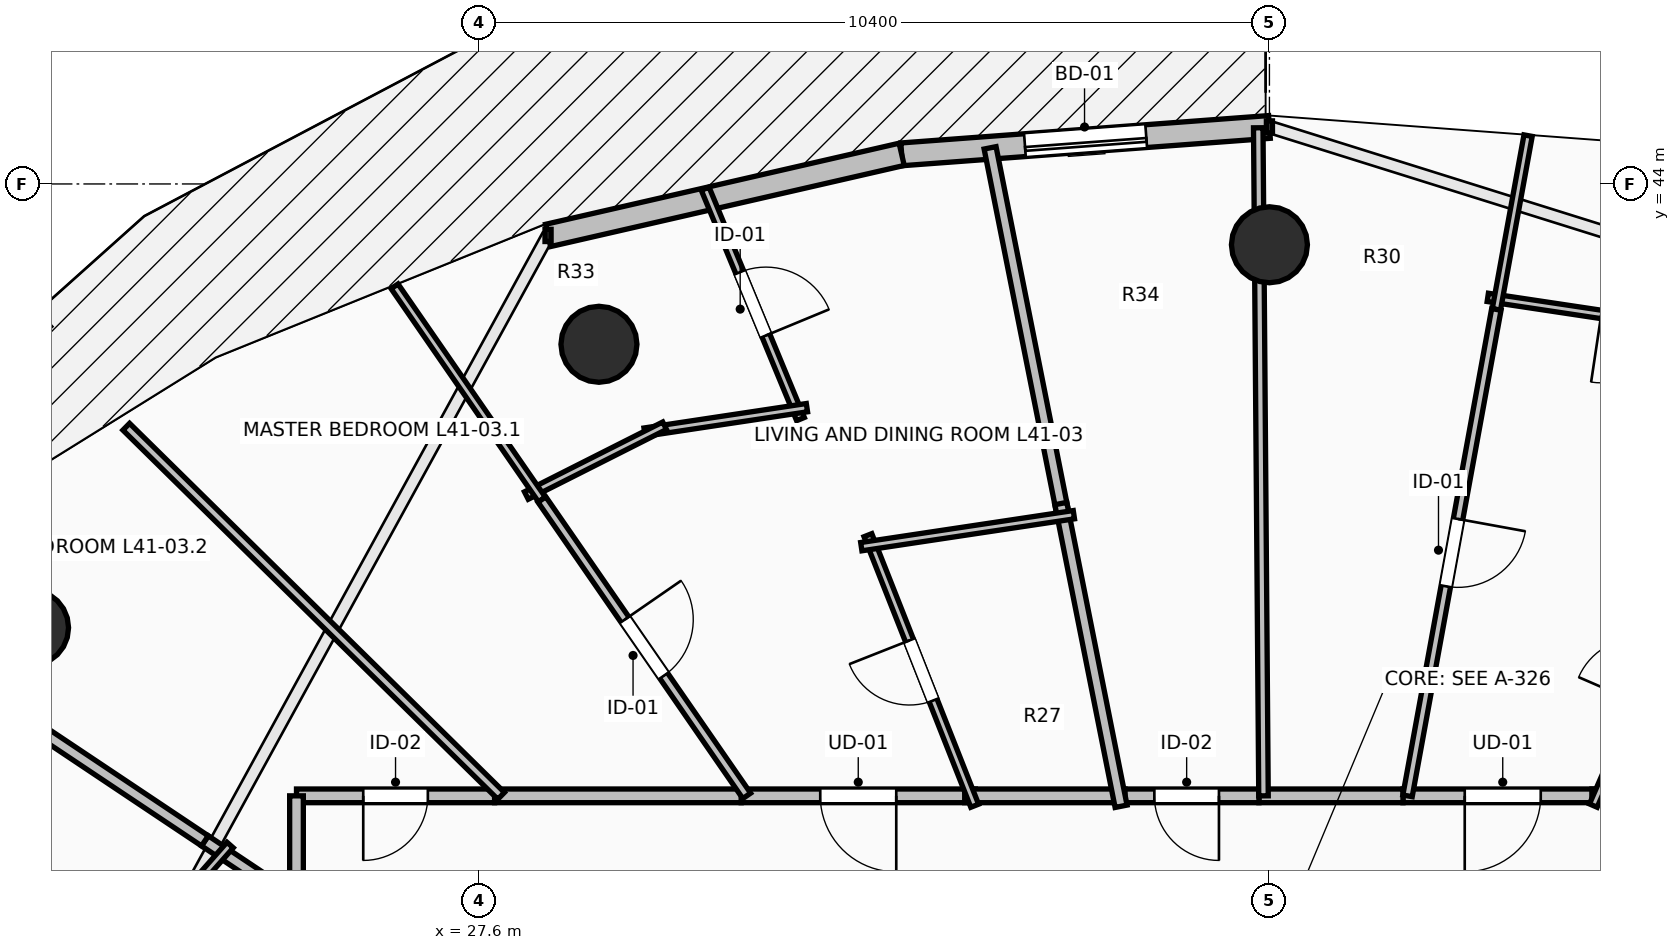
"""IFC4 building model, lengths in metres.
Left out: names, types, materials, properties, quantities, classifications, styles, units other than length and angle.
Written with IfcOpenShell. Run it as: python <this file> out.ifc"""

import sys

from ifc_helpers import new_model, si_unit, direction, frame, frame_2d, origin, origin_2d, place, context, subcontext, project, spatial, rectangle, circle, extrude, element, fill, save


model = new_model("IFC4")
c1 = context("Model", 3, precision=1e-05, world=origin(), true_north=direction((0.0, 1.0)))
c2 = subcontext(c1, "Body", "Model", "MODEL_VIEW")
j1 = project(units=[si_unit("LENGTHUNIT", "METRE"), si_unit("PLANEANGLEUNIT", "RADIAN")], contexts=[c1])
p1 = place(None, origin())
s1 = spatial("IfcSite", under=j1, at=p1, CompositionType="ELEMENT")
p2 = place(p1, origin())
s2 = spatial("IfcBuilding", under=s1, at=p2, CompositionType="ELEMENT")
p3 = place(p2, frame((0.0, 0.0, 153.6)))
s3 = spatial("IfcBuildingStorey", under=s2, at=p3, CompositionType="ELEMENT", Elevation=153.6)
for number, where, z_axis, x_axis in (
    (1, (38.0, 43.2, 0.0), (0.0, 0.0, 1.0), (0.0, 1.0, 0.0)),
    (2, (29.179, 41.891, 0.0), (0.0, 0.0, 1.0), (-0.383, 0.924, 0.0)),
    (3, (21.701, 38.162, 0.0), (0.0, 0.0, 1.0), (-0.707, 0.707, 0.0)),
):
    element("IfcColumn", number, at=place(p3, frame(where, z_axis=z_axis, x_axis=x_axis)), inside=s3, PredefinedType="COLUMN", context=c2, shape_type="SweptSolid", body=[
        extrude(circle(Radius=0.5, at=origin_2d()), origin(), (0.0, 0.0, 1.0), 3.5),
    ])
p4 = place(p3, frame((38.0, 44.75, 0.0), z_axis=(0.0, 0.0, 1.0), x_axis=(-0.997237740067, -0.074275768499, 0.0)))
e4 = element("IfcWall", 4, at=p4, inside=s3, PredefinedType="STANDARD", context=c2, shape_type="SweptSolid", body=[
    extrude(rectangle(XDim=4.852, YDim=0.3, at=frame_2d((2.426, 0.0))), origin(), (0.0, 0.0, 1.0), 3.24),
])
p5 = place(p4, frame((1.626, 0.0, 0.0)))
e5 = element("IfcOpeningElement", 5, at=p5, cuts=e4, PredefinedType="OPENING", context=c2, shape_type="SweptSolid", body=[
    extrude(rectangle(XDim=1.6, YDim=2.3, at=frame_2d((0.8, 1.15))), frame((0.0, 0.165, 0.0), z_axis=(0.0, -1.0, 0.0), x_axis=(1.0, 0.0, 0.0)), (0.0, 0.0, 1.0), 0.33),
])
p6 = place(p3, frame((33.162, 44.39, 0.0), z_axis=(0.0, 0.0, 1.0), x_axis=(-0.974698897188, -0.223521944832, 0.0)))
e6 = element("IfcWall", 6, at=p6, inside=s3, PredefinedType="STANDARD", context=c2, shape_type="SweptSolid", body=[
    extrude(rectangle(XDim=4.773, YDim=0.3, at=frame_2d((2.387, 0.0))), origin(), (0.0, 0.0, 1.0), 3.24),
])
p7 = place(p3, frame((42.382, 35.95, 0.0), z_axis=(0.0, 0.0, 1.0), x_axis=(-1.0, 0.0, 0.0)))
e7 = element("IfcWall", 7, at=p7, inside=s3, PredefinedType="PARTITIONING", context=c2, shape_type="SweptSolid", body=[
    extrude(rectangle(XDim=2.625, YDim=0.18, at=frame_2d((1.312, 0.0))), origin(), (0.0, 0.0, 1.0), 2.886),
])
p8 = place(p7, frame((0.812, 0.0, 0.0)))
e8 = element("IfcOpeningElement", 8, at=p8, cuts=e7, PredefinedType="OPENING", context=c2, shape_type="SweptSolid", body=[
    extrude(rectangle(XDim=1.0, YDim=2.15, at=frame_2d((0.5, 1.075))), frame((0.0, 0.105, 0.0), z_axis=(0.0, -1.0, 0.0), x_axis=(1.0, 0.0, 0.0)), (0.0, 0.0, 1.0), 0.21),
])
p9 = place(p3, frame((44.728, 35.95, 0.0), z_axis=(0.0, 0.0, 1.0), x_axis=(-1.0, 0.0, 0.0)))
e9 = element("IfcWall", 9, at=p9, inside=s3, PredefinedType="PARTITIONING", context=c2, shape_type="SweptSolid", body=[
    extrude(rectangle(XDim=2.486, YDim=0.18, at=frame_2d((1.243, 0.0))), origin(), (0.0, 0.0, 1.0), 2.886),
])
p10 = place(p3, frame((39.757, 35.95, 0.0), z_axis=(0.0, 0.0, 1.0), x_axis=(-1.0, 0.0, 0.0)))
e10 = element("IfcWall", 10, at=p10, inside=s3, PredefinedType="PARTITIONING", context=c2, shape_type="SweptSolid", body=[
    extrude(rectangle(XDim=1.895, YDim=0.18, at=frame_2d((0.948, 0.0))), origin(), (0.0, 0.0, 1.0), 2.886),
])
p11 = place(p3, frame((37.862, 35.95, 0.0), z_axis=(0.0, 0.0, 1.0), x_axis=(-1.0, 0.0, 0.0)))
e11 = element("IfcWall", 11, at=p11, inside=s3, PredefinedType="PARTITIONING", context=c2, shape_type="SweptSolid", body=[
    extrude(rectangle(XDim=1.902, YDim=0.18, at=frame_2d((0.951, 0.0))), origin(), (0.0, 0.0, 1.0), 2.886),
])
p12 = place(p11, frame((0.526, 0.0, 0.0)))
e12 = element("IfcOpeningElement", 12, at=p12, cuts=e11, PredefinedType="OPENING", context=c2, shape_type="SweptSolid", body=[
    extrude(rectangle(XDim=0.85, YDim=2.1, at=frame_2d((0.425, 1.05))), frame((0.0, 0.105, 0.0), z_axis=(0.0, -1.0, 0.0), x_axis=(1.0, 0.0, 0.0)), (0.0, 0.0, 1.0), 0.21),
])
p13 = place(p3, frame((34.131, 35.95, 0.0), z_axis=(0.0, 0.0, 1.0), x_axis=(-1.0, 0.0, 0.0)))
e13 = element("IfcWall", 13, at=p13, inside=s3, PredefinedType="PARTITIONING", context=c2, shape_type="SweptSolid", body=[
    extrude(rectangle(XDim=3.081, YDim=0.18, at=frame_2d((1.541, 0.0))), origin(), (0.0, 0.0, 1.0), 2.886),
])
p14 = place(p13, frame((1.041, 0.0, 0.0)))
e14 = element("IfcOpeningElement", 14, at=p14, cuts=e13, PredefinedType="OPENING", context=c2, shape_type="SweptSolid", body=[
    extrude(rectangle(XDim=1.0, YDim=2.15, at=frame_2d((0.5, 1.075))), frame((0.0, 0.105, 0.0), z_axis=(0.0, -1.0, 0.0), x_axis=(1.0, 0.0, 0.0)), (0.0, 0.0, 1.0), 0.21),
])
p15 = place(p3, frame((36.1, 35.95, 0.0), z_axis=(0.0, 0.0, 1.0), x_axis=(-1.0, 0.0, 0.0)))
e15 = element("IfcWall", 15, at=p15, inside=s3, PredefinedType="PARTITIONING", context=c2, shape_type="SweptSolid", body=[
    extrude(rectangle(XDim=2.109, YDim=0.18, at=frame_2d((1.055, 0.0))), origin(), (0.0, 0.0, 1.0), 2.886),
])
p16 = place(p3, frame((31.05, 35.95, 0.0), z_axis=(0.0, 0.0, 1.0), x_axis=(-1.0, 0.0, 0.0)))
e16 = element("IfcWall", 16, at=p16, inside=s3, PredefinedType="PARTITIONING", context=c2, shape_type="SweptSolid", body=[
    extrude(rectangle(XDim=3.244, YDim=0.18, at=frame_2d((1.622, 0.0))), origin(), (0.0, 0.0, 1.0), 2.432),
])
p17 = place(p3, frame((27.806, 35.95, 0.0), z_axis=(0.0, 0.0, 1.0), x_axis=(-1.0, 0.0, 0.0)))
e17 = element("IfcWall", 17, at=p17, inside=s3, PredefinedType="PARTITIONING", context=c2, shape_type="SweptSolid", body=[
    extrude(rectangle(XDim=2.606, YDim=0.18, at=frame_2d((1.303, 0.0))), origin(), (0.0, 0.0, 1.0), 2.432),
])
p18 = place(p17, frame((0.878, 0.0, 0.0)))
e18 = element("IfcOpeningElement", 18, at=p18, cuts=e17, PredefinedType="OPENING", context=c2, shape_type="SweptSolid", body=[
    extrude(rectangle(XDim=0.85, YDim=2.1, at=frame_2d((0.425, 1.05))), frame((0.0, 0.105, 0.0), z_axis=(0.0, -1.0, 0.0), x_axis=(1.0, 0.0, 0.0)), (0.0, 0.0, 1.0), 0.21),
])
p19 = place(p3, frame((25.2, 35.95, 0.0), z_axis=(0.0, 0.0, 1.0), x_axis=(0.0, -1.0, 0.0)))
e19 = element("IfcWall", 19, at=p19, inside=s3, PredefinedType="PARTITIONING", context=c2, shape_type="SweptSolid", body=[
    extrude(rectangle(XDim=1.457, YDim=0.18, at=frame_2d((0.729, 0.0))), origin(), (0.0, 0.0, 1.0), 2.432),
])
p20 = place(p3, frame((42.261, 35.822, 0.0), z_axis=(0.0, 0.0, 1.0), x_axis=(0.398098222937, 0.917342795739, 0.0)))
e20 = element("IfcWall", 20, at=p20, inside=s3, PredefinedType="PARTITIONING", context=c2, shape_type="SweptSolid", body=[
    extrude(rectangle(XDim=3.797, YDim=0.11, at=frame_2d((1.898, 0.0))), origin(), (0.0, 0.0, 1.0), 2.886),
])
p21 = place(p20, frame((1.473, 0.0, 0.0)))
e21 = element("IfcOpeningElement", 21, at=p21, cuts=e20, PredefinedType="OPENING", context=c2, shape_type="SweptSolid", body=[
    extrude(rectangle(XDim=0.85, YDim=2.1, at=frame_2d((0.425, 1.05))), frame((0.0, 0.07, 0.0), z_axis=(0.0, -1.0, 0.0), x_axis=(1.0, 0.0, 0.0)), (0.0, 0.0, 1.0), 0.14),
])
p22 = place(p3, frame((44.75, 41.925, 0.0), z_axis=(0.0, 0.0, 1.0), x_axis=(-0.988899781081, 0.148584060306, 0.0)))
e22 = element("IfcWall", 22, at=p22, inside=s3, PredefinedType="PARTITIONING", context=c2, shape_type="SweptSolid", body=[
    extrude(rectangle(XDim=3.92, YDim=0.11, at=frame_2d((1.96, 0.0))), origin(), (0.0, 0.0, 1.0), 3.24),
])
p23 = place(p22, frame((1.51, 0.0, 0.0)))
e23 = element("IfcOpeningElement", 23, at=p23, cuts=e22, PredefinedType="OPENING", context=c2, shape_type="SweptSolid", body=[
    extrude(rectangle(XDim=0.9, YDim=2.1, at=frame_2d((0.45, 1.05))), frame((0.0, 0.07, 0.0), z_axis=(0.0, -1.0, 0.0), x_axis=(1.0, 0.0, 0.0)), (0.0, 0.0, 1.0), 0.14),
])
p24 = place(p3, frame((40.986, 42.349, 0.0), z_axis=(0.0, 0.0, 1.0), x_axis=(0.179523238587, 0.983753732805, 0.0)))
e24 = element("IfcWall", 24, at=p24, inside=s3, PredefinedType="PARTITIONING", context=c2, shape_type="SweptSolid", body=[
    extrude(rectangle(XDim=2.324, YDim=0.11, at=frame_2d((1.162, 0.0))), origin(), (0.0, 0.0, 1.0), 2.728),
])
p25 = place(p3, frame((40.986, 42.349, 0.0), z_axis=(0.0, 0.0, 1.0), x_axis=(-0.179654893395, -0.983729698281, 0.0)))
e25 = element("IfcWall", 25, at=p25, inside=s3, PredefinedType="PARTITIONING", context=c2, shape_type="SweptSolid", body=[
    extrude(rectangle(XDim=6.505, YDim=0.125, at=frame_2d((3.253, 0.0))), origin(), (0.0, 0.0, 1.0), 2.886),
])
p26 = place(p25, frame((2.802, 0.0, 0.0)))
e26 = element("IfcOpeningElement", 26, at=p26, cuts=e25, PredefinedType="OPENING", context=c2, shape_type="SweptSolid", body=[
    extrude(rectangle(XDim=0.9, YDim=2.1, at=frame_2d((0.45, 1.05))), frame((0.0, 0.077, 0.0), z_axis=(0.0, -1.0, 0.0), x_axis=(1.0, 0.0, 0.0)), (0.0, 0.0, 1.0), 0.155),
])
p27 = place(p3, frame((37.853, 44.739, 0.0), z_axis=(0.0, 0.0, 1.0), x_axis=(0.007860868226, -0.999969102898, 0.0)))
e27 = element("IfcWall", 27, at=p27, inside=s3, PredefinedType="PARTITIONING", context=c2, shape_type="SweptSolid", body=[
    extrude(rectangle(XDim=8.789, YDim=0.125, at=frame_2d((4.395, 0.0))), origin(), (0.0, 0.0, 1.0), 2.432),
])
p28 = place(p3, frame((34.325, 44.475, 0.0), z_axis=(0.0, 0.0, 1.0), x_axis=(0.195054941626, -0.980792317337, 0.0)))
e28 = element("IfcWall", 28, at=p28, inside=s3, PredefinedType="PARTITIONING", context=c2, shape_type="SweptSolid", body=[
    extrude(rectangle(XDim=4.911, YDim=0.16, at=frame_2d((2.456, 0.0))), origin(), (0.0, 0.0, 1.0), 2.432),
])
p29 = place(p3, frame((35.256, 39.795, 0.0), z_axis=(0.0, 0.0, 1.0), x_axis=(0.195214230991, -0.980760625239, 0.0)))
e29 = element("IfcWall", 29, at=p29, inside=s3, PredefinedType="PARTITIONING", context=c2, shape_type="SweptSolid", body=[
    extrude(rectangle(XDim=4.061, YDim=0.16, at=frame_2d((2.03, 0.0))), origin(), (0.0, 0.0, 1.0), 2.886),
])
p30 = place(p3, frame((34.122, 35.82, 0.0), z_axis=(0.0, 0.0, 1.0), x_axis=(-0.36711859649, 0.930174142896, 0.0)))
e30 = element("IfcWall", 30, at=p30, inside=s3, PredefinedType="PARTITIONING", context=c2, shape_type="SweptSolid", body=[
    extrude(rectangle(XDim=3.826, YDim=0.11, at=frame_2d((1.913, 0.0))), origin(), (0.0, 0.0, 1.0), 2.432),
])
p31 = place(p30, frame((1.488, 0.0, 0.0)))
e31 = element("IfcOpeningElement", 31, at=p31, cuts=e30, PredefinedType="OPENING", context=c2, shape_type="SweptSolid", body=[
    extrude(rectangle(XDim=0.85, YDim=2.1, at=frame_2d((0.425, 1.05))), frame((0.0, 0.07, 0.0), z_axis=(0.0, -1.0, 0.0), x_axis=(1.0, 0.0, 0.0)), (0.0, 0.0, 1.0), 0.14),
])
p32 = place(p3, frame((32.631, 39.228, 0.0), z_axis=(0.0, 0.0, 1.0), x_axis=(0.988890718673, 0.148644362566, 0.0)))
e32 = element("IfcWall", 32, at=p32, inside=s3, PredefinedType="PARTITIONING", context=c2, shape_type="SweptSolid", body=[
    extrude(rectangle(XDim=2.828, YDim=0.11, at=frame_2d((1.414, 0.0))), origin(), (0.0, 0.0, 1.0), 2.432),
])
p33 = place(p3, frame((30.576, 43.938, 0.0), z_axis=(0.0, 0.0, 1.0), x_axis=(0.382336453712, -0.924023179451, 0.0)))
e33 = element("IfcWall", 33, at=p33, inside=s3, PredefinedType="PARTITIONING", context=c2, shape_type="SweptSolid", body=[
    extrude(rectangle(XDim=3.28, YDim=0.11, at=frame_2d((1.64, 0.0))), origin(), (0.0, 0.0, 1.0), 2.728),
])
p34 = place(p33, frame((1.19, 0.0, 0.0)))
e34 = element("IfcOpeningElement", 34, at=p34, cuts=e33, PredefinedType="OPENING", context=c2, shape_type="SweptSolid", body=[
    extrude(rectangle(XDim=0.9, YDim=2.1, at=frame_2d((0.45, 1.05))), frame((0.0, 0.07, 0.0), z_axis=(0.0, -1.0, 0.0), x_axis=(1.0, 0.0, 0.0)), (0.0, 0.0, 1.0), 0.14),
])
p35 = place(p3, frame((31.915, 41.057, 0.0), z_axis=(0.0, 0.0, 1.0), x_axis=(-0.98883996758, -0.148981604626, 0.0)))
e35 = element("IfcWall", 35, at=p35, inside=s3, PredefinedType="PARTITIONING", context=c2, shape_type="SweptSolid", body=[
    extrude(rectangle(XDim=2.16, YDim=0.11, at=frame_2d((1.08, 0.0))), origin(), (0.0, 0.0, 1.0), 3.24),
])
p36 = place(p3, frame((30.043, 40.819, 0.0), z_axis=(0.0, 0.0, 1.0), x_axis=(-0.892695055898, -0.450661222179, 0.0)))
e36 = element("IfcWall", 36, at=p36, inside=s3, PredefinedType="PARTITIONING", context=c2, shape_type="SweptSolid", body=[
    extrude(rectangle(XDim=2.038, YDim=0.11, at=frame_2d((1.019, 0.0))), origin(), (0.0, 0.0, 1.0), 2.432),
])
p37 = place(p3, frame((28.429, 39.849, 0.0), z_axis=(0.0, 0.0, 1.0), x_axis=(-0.568554374161, 0.822645685349, 0.0)))
e37 = element("IfcWall", 37, at=p37, inside=s3, PredefinedType="PARTITIONING", context=c2, shape_type="SweptSolid", body=[
    extrude(rectangle(XDim=3.409, YDim=0.11, at=frame_2d((1.705, 0.0))), origin(), (0.0, 0.0, 1.0), 2.728),
])
p38 = place(p3, frame((28.428, 39.849, 0.0), z_axis=(0.0, 0.0, 1.0), x_axis=(0.568542808453, -0.822653678626, 0.0)))
e38 = element("IfcWall", 38, at=p38, inside=s3, PredefinedType="PARTITIONING", context=c2, shape_type="SweptSolid", body=[
    extrude(rectangle(XDim=4.74, YDim=0.125, at=frame_2d((2.37, 0.0))), origin(), (0.0, 0.0, 1.0), 2.432),
])
p39 = place(p38, frame((1.92, 0.0, 0.0)))
e39 = element("IfcOpeningElement", 39, at=p39, cuts=e38, PredefinedType="OPENING", context=c2, shape_type="SweptSolid", body=[
    extrude(rectangle(XDim=0.9, YDim=2.1, at=frame_2d((0.45, 1.05))), frame((0.0, 0.077, 0.0), z_axis=(0.0, -1.0, 0.0), x_axis=(1.0, 0.0, 0.0)), (0.0, 0.0, 1.0), 0.155),
])
p40 = place(p3, frame((22.96, 40.806, 0.0), z_axis=(0.0, 0.0, 1.0), x_axis=(0.712587980465, -0.70158276069, 0.0)))
e40 = element("IfcWall", 40, at=p40, inside=s3, PredefinedType="PARTITIONING", context=c2, shape_type="SweptSolid", body=[
    extrude(rectangle(XDim=6.921, YDim=0.125, at=frame_2d((3.461, 0.0))), origin(), (0.0, 0.0, 1.0), 2.432),
])
p41 = place(p3, frame((23.995, 35.358, 0.0), z_axis=(0.0, 0.0, 1.0), x_axis=(0.831505536539, -0.555516464837, 0.0)))
e41 = element("IfcWall", 41, at=p41, inside=s3, PredefinedType="PARTITIONING", context=c2, shape_type="SweptSolid", body=[
    extrude(rectangle(XDim=1.449, YDim=0.16, at=frame_2d((0.725, 0.0))), origin(), (0.0, 0.0, 1.0), 3.24),
])
p42 = place(p3, frame((19.495, 38.364, 0.0), z_axis=(0.0, 0.0, 1.0), x_axis=(0.831529389247, -0.55548076008, 0.0)))
e42 = element("IfcWall", 42, at=p42, inside=s3, PredefinedType="PARTITIONING", context=c2, shape_type="SweptSolid", body=[
    extrude(rectangle(XDim=5.412, YDim=0.16, at=frame_2d((2.706, 0.0))), origin(), (0.0, 0.0, 1.0), 2.728),
])
p43 = place(p3, frame((22.081, 32.761, 0.0), z_axis=(0.0, 0.0, 1.0), x_axis=(0.662023888113, 0.749482736004, 0.0)))
e43 = element("IfcWall", 43, at=p43, inside=s3, PredefinedType="PARTITIONING", context=c2, shape_type="SweptSolid", body=[
    extrude(rectangle(XDim=3.392, YDim=0.11, at=frame_2d((1.696, 0.0))), origin(), (0.0, 0.0, 1.0), 3.24),
])
p44 = place(p5, origin())
e44 = element("IfcDoor", 44, at=p44, inside=s3, OperationType="SLIDING_TO_LEFT", PredefinedType="DOOR", context=c2, shape_type="SweptSolid", body=[
    extrude(rectangle(XDim=1.6, YDim=2.3, at=frame_2d((0.8, 1.15))), frame((0.0, 0.025, 0.0), z_axis=(0.0, -1.0, 0.0), x_axis=(1.0, 0.0, 0.0)), (0.0, 0.0, 1.0), 0.05),
])
fill(e5, e44)
p45 = place(p8, origin())
e45 = element("IfcDoor", 45, at=p45, inside=s3, OperationType="SINGLE_SWING_RIGHT", PredefinedType="DOOR", context=c2, shape_type="SweptSolid", body=[
    extrude(rectangle(XDim=1.0, YDim=2.15, at=frame_2d((0.5, 1.075))), frame((0.0, 0.025, 0.0), z_axis=(0.0, -1.0, 0.0), x_axis=(1.0, 0.0, 0.0)), (0.0, 0.0, 1.0), 0.05),
])
fill(e8, e45)
p46 = place(p14, origin())
e46 = element("IfcDoor", 46, at=p46, inside=s3, OperationType="SINGLE_SWING_LEFT", PredefinedType="DOOR", context=c2, shape_type="SweptSolid", body=[
    extrude(rectangle(XDim=1.0, YDim=2.15, at=frame_2d((0.5, 1.075))), frame((0.0, 0.025, 0.0), z_axis=(0.0, -1.0, 0.0), x_axis=(1.0, 0.0, 0.0)), (0.0, 0.0, 1.0), 0.05),
])
fill(e14, e46)
p47 = place(p26, origin())
e47 = element("IfcDoor", 47, at=p47, inside=s3, OperationType="SINGLE_SWING_LEFT", PredefinedType="DOOR", context=c2, shape_type="SweptSolid", body=[
    extrude(rectangle(XDim=0.9, YDim=2.1, at=frame_2d((0.45, 1.05))), frame((0.0, 0.025, 0.0), z_axis=(0.0, -1.0, 0.0), x_axis=(1.0, 0.0, 0.0)), (0.0, 0.0, 1.0), 0.05),
])
fill(e26, e47)
p48 = place(p31, origin())
e48 = element("IfcDoor", 48, at=p48, inside=s3, OperationType="SINGLE_SWING_RIGHT", PredefinedType="DOOR", context=c2, shape_type="SweptSolid", body=[
    extrude(rectangle(XDim=0.85, YDim=2.1, at=frame_2d((0.425, 1.05))), frame((0.0, 0.025, 0.0), z_axis=(0.0, -1.0, 0.0), x_axis=(1.0, 0.0, 0.0)), (0.0, 0.0, 1.0), 0.05),
])
fill(e31, e48)
p49 = place(p34, origin())
e49 = element("IfcDoor", 49, at=p49, inside=s3, OperationType="SINGLE_SWING_RIGHT", PredefinedType="DOOR", context=c2, shape_type="SweptSolid", body=[
    extrude(rectangle(XDim=0.9, YDim=2.1, at=frame_2d((0.45, 1.05))), frame((0.0, 0.025, 0.0), z_axis=(0.0, -1.0, 0.0), x_axis=(1.0, 0.0, 0.0)), (0.0, 0.0, 1.0), 0.05),
])
fill(e34, e49)
p50 = place(p39, origin())
e50 = element("IfcDoor", 50, at=p50, inside=s3, OperationType="SINGLE_SWING_LEFT", PredefinedType="DOOR", context=c2, shape_type="SweptSolid", body=[
    extrude(rectangle(XDim=0.9, YDim=2.1, at=frame_2d((0.45, 1.05))), frame((0.0, 0.025, 0.0), z_axis=(0.0, -1.0, 0.0), x_axis=(1.0, 0.0, 0.0)), (0.0, 0.0, 1.0), 0.05),
])
fill(e39, e50)
p51 = place(p12, origin())
e51 = element("IfcDoor", 51, at=p51, inside=s3, OperationType="SINGLE_SWING_LEFT", PredefinedType="DOOR", context=c2, shape_type="SweptSolid", body=[
    extrude(rectangle(XDim=0.85, YDim=2.1, at=frame_2d((0.425, 1.05))), frame((0.0, 0.025, 0.0), z_axis=(0.0, -1.0, 0.0), x_axis=(1.0, 0.0, 0.0)), (0.0, 0.0, 1.0), 0.05),
])
fill(e12, e51)
p52 = place(p18, origin())
e52 = element("IfcDoor", 52, at=p52, inside=s3, OperationType="SINGLE_SWING_RIGHT", PredefinedType="DOOR", context=c2, shape_type="SweptSolid", body=[
    extrude(rectangle(XDim=0.85, YDim=2.1, at=frame_2d((0.425, 1.05))), frame((0.0, 0.025, 0.0), z_axis=(0.0, -1.0, 0.0), x_axis=(1.0, 0.0, 0.0)), (0.0, 0.0, 1.0), 0.05),
])
fill(e18, e52)
save(model, sys.argv[1])
